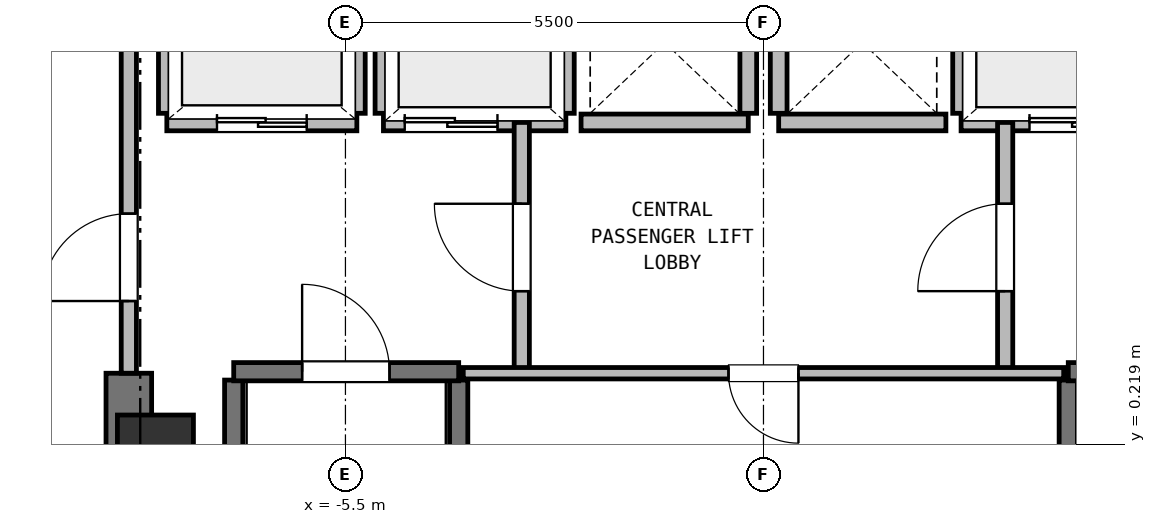
"""IFC4 building model, lengths in metres.
Left out: names, types, materials, properties, quantities, classifications, styles, units other than length and angle.
Written with IfcOpenShell. Run it as: python <this file> out.ifc"""

import sys

from ifc_helpers import new_model, si_unit, direction, frame, frame_2d, origin, origin_2d, place, context, subcontext, project, spatial, rectangle, extrude, element, fill, save


model = new_model("IFC4")
c1 = context("Model", 3, precision=1e-05, world=origin(), true_north=direction((0.0, 1.0)))
c2 = subcontext(c1, "Body", "Model", "MODEL_VIEW")
j1 = project(units=[si_unit("LENGTHUNIT", "METRE"), si_unit("PLANEANGLEUNIT", "RADIAN")], contexts=[c1])
p1 = place(None, origin())
s1 = spatial("IfcSite", under=j1, at=p1, CompositionType="ELEMENT")
p2 = place(p1, origin())
s2 = spatial("IfcBuilding", under=s1, at=p2, CompositionType="ELEMENT")
p3 = place(p2, frame((0.0, 0.0, 131.0)))
s3 = spatial("IfcBuildingStorey", under=s2, at=p3, CompositionType="ELEMENT", Elevation=131.0)
p4 = place(p3, frame((-8.0, 0.0, 0.0), z_axis=(0.0, 0.0, 1.0), x_axis=(1.0, 0.0, 0.0)))
e1 = element("IfcColumn", 1, at=p4, inside=s3, PredefinedType="COLUMN", context=c2, shape_type="SweptSolid", body=[
    extrude(rectangle(XDim=1.0, YDim=1.2, at=origin_2d()), origin(), (0.0, 0.0, 1.0), 3.75),
])
p5 = place(p3, frame((-8.35, -6.95, 0.0), z_axis=(0.0, 0.0, 1.0), x_axis=(0.0, 1.0, 0.0)))
e2 = element("IfcWall", 2, at=p5, inside=s3, PredefinedType="SHEAR", context=c2, shape_type="SweptSolid", body=[
    extrude(rectangle(XDim=8.1, YDim=0.6, at=frame_2d((4.05, 0.0))), origin(), (0.0, 0.0, 1.0), 3.5),
])
for number, where, z_axis, x_axis in (
    (3, (-6.97, -6.16, 0.0), (0.0, 0.0, 1.0), (0.0, 1.0, 0.0)),
    (4, (-4.01, -6.16, 0.0), (0.0, 0.0, 1.0), (0.0, 1.0, 0.0)),
):
    element("IfcWall", number, at=place(p3, frame(where, z_axis=z_axis, x_axis=x_axis)), inside=s3, PredefinedType="SHEAR", context=c2, shape_type="SweptSolid", body=[
        extrude(rectangle(XDim=7.22, YDim=0.24, at=frame_2d((3.61, 0.0))), origin(), (0.0, 0.0, 1.0), 3.5),
    ])
p6 = place(p3, frame((-6.97, 1.17, 0.0), z_axis=(0.0, 0.0, 1.0), x_axis=(1.0, 0.0, 0.0)))
e5 = element("IfcWall", 5, at=p6, inside=s3, PredefinedType="SHEAR", context=c2, shape_type="SweptSolid", body=[
    extrude(rectangle(XDim=2.96, YDim=0.24, at=frame_2d((1.48, 0.0))), origin(), (0.0, 0.0, 1.0), 3.5),
])
p7 = place(p6, frame((0.9, 0.0, 0.0)))
e6 = element("IfcOpeningElement", 6, at=p7, cuts=e5, PredefinedType="OPENING", context=c2, shape_type="SweptSolid", body=[
    extrude(rectangle(XDim=1.15, YDim=2.15, at=frame_2d((0.575, 1.075))), frame((0.0, 0.13, 0.0), z_axis=(0.0, -1.0, 0.0), x_axis=(1.0, 0.0, 0.0)), (0.0, 0.0, 1.0), 0.26),
])
p8 = place(p3, frame((4.01, -6.16, 0.0), z_axis=(0.0, 0.0, 1.0), x_axis=(0.0, 1.0, 0.0)))
e7 = element("IfcWall", 7, at=p8, inside=s3, PredefinedType="SHEAR", context=c2, shape_type="SweptSolid", body=[
    extrude(rectangle(XDim=7.22, YDim=0.24, at=frame_2d((3.61, 0.0))), origin(), (0.0, 0.0, 1.0), 3.5),
])
p9 = place(p3, frame((4.01, 1.17, 0.0), z_axis=(0.0, 0.0, 1.0), x_axis=(1.0, 0.0, 0.0)))
e8 = element("IfcWall", 8, at=p9, inside=s3, PredefinedType="SHEAR", context=c2, shape_type="SweptSolid", body=[
    extrude(rectangle(XDim=2.96, YDim=0.24, at=frame_2d((1.48, 0.0))), origin(), (0.0, 0.0, 1.0), 3.5),
])
p10 = place(p9, frame((0.9, 0.0, 0.0)))
e9 = element("IfcOpeningElement", 9, at=p10, cuts=e8, PredefinedType="OPENING", context=c2, shape_type="SweptSolid", body=[
    extrude(rectangle(XDim=1.15, YDim=2.15, at=frame_2d((0.575, 1.075))), frame((0.0, 0.13, 0.0), z_axis=(0.0, -1.0, 0.0), x_axis=(1.0, 0.0, 0.0)), (0.0, 0.0, 1.0), 0.26),
])
p11 = place(p3, frame((-7.85, 4.45, 0.0), z_axis=(0.0, 0.0, 1.0), x_axis=(1.0, 0.0, 0.0)))
e10 = element("IfcWall", 10, at=p11, inside=s3, PredefinedType="PARTITIONING", context=c2, shape_type="SweptSolid", body=[
    extrude(rectangle(XDim=2.5, YDim=0.22, at=frame_2d((1.25, 0.0))), origin(), (0.0, 0.0, 1.0), 3.5),
])
p12 = place(p11, frame((0.66, 0.0, 0.0)))
e11 = element("IfcOpeningElement", 11, at=p12, cuts=e10, PredefinedType="OPENING", context=c2, shape_type="SweptSolid", body=[
    extrude(rectangle(XDim=1.18, YDim=2.15, at=frame_2d((0.59, 1.075))), frame((0.0, 0.12, 0.0), z_axis=(0.0, -1.0, 0.0), x_axis=(1.0, 0.0, 0.0)), (0.0, 0.0, 1.0), 0.24),
])
p13 = place(p3, frame((-7.85, 4.57, 0.0), z_axis=(0.0, 0.0, 1.0), x_axis=(0.0, 1.0, 0.0)))
e12 = element("IfcWall", 12, at=p13, inside=s3, PredefinedType="PARTITIONING", context=c2, shape_type="SweptSolid", body=[
    extrude(rectangle(XDim=2.08, YDim=0.22, at=frame_2d((1.04, 0.0))), origin(), (0.0, 0.0, 1.0), 3.12),
])
p14 = place(p3, frame((-5.35, 4.57, 0.0), z_axis=(0.0, 0.0, 1.0), x_axis=(0.0, 1.0, 0.0)))
e13 = element("IfcWall", 13, at=p14, inside=s3, PredefinedType="PARTITIONING", context=c2, shape_type="SweptSolid", body=[
    extrude(rectangle(XDim=2.08, YDim=0.22, at=frame_2d((1.04, 0.0))), origin(), (0.0, 0.0, 1.0), 3.5),
])
p15 = place(p3, frame((-5.0, 4.45, 0.0), z_axis=(0.0, 0.0, 1.0), x_axis=(1.0, 0.0, 0.0)))
e14 = element("IfcWall", 14, at=p15, inside=s3, PredefinedType="PARTITIONING", context=c2, shape_type="SweptSolid", body=[
    extrude(rectangle(XDim=2.4, YDim=0.22, at=frame_2d((1.2, 0.0))), origin(), (0.0, 0.0, 1.0), 3.5),
])
p16 = place(p15, frame((0.28, 0.0, 0.0)))
e15 = element("IfcOpeningElement", 15, at=p16, cuts=e14, PredefinedType="OPENING", context=c2, shape_type="SweptSolid", body=[
    extrude(rectangle(XDim=1.22, YDim=2.15, at=frame_2d((0.61, 1.075))), frame((0.0, 0.12, 0.0), z_axis=(0.0, -1.0, 0.0), x_axis=(1.0, 0.0, 0.0)), (0.0, 0.0, 1.0), 0.24),
])
for number, where, z_axis, x_axis in (
    (16, (-5.0, 4.57, 0.0), (0.0, 0.0, 1.0), (0.0, 1.0, 0.0)),
    (17, (-2.6, 4.57, 0.0), (0.0, 0.0, 1.0), (0.0, 1.0, 0.0)),
):
    element("IfcWall", number, at=place(p3, frame(where, z_axis=z_axis, x_axis=x_axis)), inside=s3, PredefinedType="PARTITIONING", context=c2, shape_type="SweptSolid", body=[
        extrude(rectangle(XDim=2.08, YDim=0.22, at=frame_2d((1.04, 0.0))), origin(), (0.0, 0.0, 1.0), 3.5),
    ])
p17 = place(p3, frame((2.6, 4.45, 0.0), z_axis=(0.0, 0.0, 1.0), x_axis=(1.0, 0.0, 0.0)))
e18 = element("IfcWall", 18, at=p17, inside=s3, PredefinedType="PARTITIONING", context=c2, shape_type="SweptSolid", body=[
    extrude(rectangle(XDim=2.4, YDim=0.22, at=frame_2d((1.2, 0.0))), origin(), (0.0, 0.0, 1.0), 3.5),
])
p18 = place(p17, frame((0.9, 0.0, 0.0)))
e19 = element("IfcOpeningElement", 19, at=p18, cuts=e18, PredefinedType="OPENING", context=c2, shape_type="SweptSolid", body=[
    extrude(rectangle(XDim=1.22, YDim=2.15, at=frame_2d((0.61, 1.075))), frame((0.0, 0.12, 0.0), z_axis=(0.0, -1.0, 0.0), x_axis=(1.0, 0.0, 0.0)), (0.0, 0.0, 1.0), 0.24),
])
p19 = place(p3, frame((2.6, 4.57, 0.0), z_axis=(0.0, 0.0, 1.0), x_axis=(0.0, 1.0, 0.0)))
e20 = element("IfcWall", 20, at=p19, inside=s3, PredefinedType="PARTITIONING", context=c2, shape_type="SweptSolid", body=[
    extrude(rectangle(XDim=2.08, YDim=0.22, at=frame_2d((1.04, 0.0))), origin(), (0.0, 0.0, 1.0), 3.5),
])
p20 = place(p3, frame((-2.4, 4.45, 0.0), z_axis=(0.0, 0.0, 1.0), x_axis=(1.0, 0.0, 0.0)))
e21 = element("IfcWall", 21, at=p20, inside=s3, PredefinedType="PARTITIONING", context=c2, shape_type="SweptSolid", body=[
    extrude(rectangle(XDim=2.2, YDim=0.22, at=frame_2d((1.1, 0.0))), origin(), (0.0, 0.0, 1.0), 3.5),
])
p21 = place(p3, frame((-0.2, 4.57, 0.0), z_axis=(0.0, 0.0, 1.0), x_axis=(0.0, 1.0, 0.0)))
e22 = element("IfcWall", 22, at=p21, inside=s3, PredefinedType="PARTITIONING", context=c2, shape_type="SweptSolid", body=[
    extrude(rectangle(XDim=2.08, YDim=0.22, at=frame_2d((1.04, 0.0))), origin(), (0.0, 0.0, 1.0), 3.5),
])
p22 = place(p3, frame((0.2, 4.45, 0.0), z_axis=(0.0, 0.0, 1.0), x_axis=(1.0, 0.0, 0.0)))
e23 = element("IfcWall", 23, at=p22, inside=s3, PredefinedType="PARTITIONING", context=c2, shape_type="SweptSolid", body=[
    extrude(rectangle(XDim=2.2, YDim=0.22, at=frame_2d((1.1, 0.0))), origin(), (0.0, 0.0, 1.0), 3.5),
])
p23 = place(p3, frame((0.2, 4.57, 0.0), z_axis=(0.0, 0.0, 1.0), x_axis=(0.0, 1.0, 0.0)))
e24 = element("IfcWall", 24, at=p23, inside=s3, PredefinedType="PARTITIONING", context=c2, shape_type="SweptSolid", body=[
    extrude(rectangle(XDim=2.08, YDim=0.22, at=frame_2d((1.04, 0.0))), origin(), (0.0, 0.0, 1.0), 3.5),
])
p24 = place(p3, frame((-3.18, 1.15, 0.0), z_axis=(0.0, 0.0, 1.0), x_axis=(0.0, 1.0, 0.0)))
e25 = element("IfcWall", 25, at=p24, inside=s3, PredefinedType="PARTITIONING", context=c2, shape_type="SweptSolid", body=[
    extrude(rectangle(XDim=3.3, YDim=0.2, at=frame_2d((1.65, 0.0))), origin(), (0.0, 0.0, 1.0), 3.5),
])
p25 = place(p24, frame((1.08, 0.0, 0.0)))
e26 = element("IfcOpeningElement", 26, at=p25, cuts=e25, PredefinedType="OPENING", context=c2, shape_type="SweptSolid", body=[
    extrude(rectangle(XDim=1.15, YDim=2.15, at=frame_2d((0.575, 1.075))), frame((0.0, 0.11, 0.0), z_axis=(0.0, -1.0, 0.0), x_axis=(1.0, 0.0, 0.0)), (0.0, 0.0, 1.0), 0.22),
])
p26 = place(p3, frame((3.18, 1.15, 0.0), z_axis=(0.0, 0.0, 1.0), x_axis=(0.0, 1.0, 0.0)))
e27 = element("IfcWall", 27, at=p26, inside=s3, PredefinedType="PARTITIONING", context=c2, shape_type="SweptSolid", body=[
    extrude(rectangle(XDim=3.3, YDim=0.2, at=frame_2d((1.65, 0.0))), origin(), (0.0, 0.0, 1.0), 3.5),
])
p27 = place(p26, frame((1.08, 0.0, 0.0)))
e28 = element("IfcOpeningElement", 28, at=p27, cuts=e27, PredefinedType="OPENING", context=c2, shape_type="SweptSolid", body=[
    extrude(rectangle(XDim=1.15, YDim=2.15, at=frame_2d((0.575, 1.075))), frame((0.0, 0.11, 0.0), z_axis=(0.0, -1.0, 0.0), x_axis=(1.0, 0.0, 0.0)), (0.0, 0.0, 1.0), 0.22),
])
p28 = place(p3, frame((-8.35, 1.15, 0.0), z_axis=(0.0, 0.0, 1.0), x_axis=(0.0, 1.0, 0.0)))
e29 = element("IfcWall", 29, at=p28, inside=s3, PredefinedType="PARTITIONING", context=c2, shape_type="SweptSolid", body=[
    extrude(rectangle(XDim=5.4, YDim=0.2, at=frame_2d((2.7, 0.0))), origin(), (0.0, 0.0, 1.0), 3.5),
])
p29 = place(p28, frame((0.95, 0.0, 0.0)))
e30 = element("IfcOpeningElement", 30, at=p29, cuts=e29, PredefinedType="OPENING", context=c2, shape_type="SweptSolid", body=[
    extrude(rectangle(XDim=1.15, YDim=2.15, at=frame_2d((0.575, 1.075))), frame((0.0, 0.11, 0.0), z_axis=(0.0, -1.0, 0.0), x_axis=(1.0, 0.0, 0.0)), (0.0, 0.0, 1.0), 0.22),
])
p30 = place(p3, frame((3.95, 1.15, 0.0), z_axis=(0.0, 0.0, 1.0), x_axis=(-1.0, 0.0, 0.0)))
e31 = element("IfcWall", 31, at=p30, inside=s3, PredefinedType="PARTITIONING", context=c2, shape_type="SweptSolid", body=[
    extrude(rectangle(XDim=7.9, YDim=0.15, at=frame_2d((3.95, 0.0))), origin(), (0.0, 0.0, 1.0), 3.5),
])
p31 = place(p30, frame((3.49, 0.0, 0.0)))
e32 = element("IfcOpeningElement", 32, at=p31, cuts=e31, PredefinedType="OPENING", context=c2, shape_type="SweptSolid", body=[
    extrude(rectangle(XDim=0.92, YDim=2.05, at=frame_2d((0.46, 1.025))), frame((0.0, 0.085, 0.0), z_axis=(0.0, -1.0, 0.0), x_axis=(1.0, 0.0, 0.0)), (0.0, 0.0, 1.0), 0.17),
])
p32 = place(p7, origin())
e33 = element("IfcDoor", 33, at=p32, inside=s3, OperationType="SINGLE_SWING_LEFT", PredefinedType="DOOR", context=c2, shape_type="SweptSolid", body=[
    extrude(rectangle(XDim=1.15, YDim=2.15, at=frame_2d((0.575, 1.075))), frame((0.0, 0.025, 0.0), z_axis=(0.0, -1.0, 0.0), x_axis=(1.0, 0.0, 0.0)), (0.0, 0.0, 1.0), 0.05),
])
fill(e6, e33)
p33 = place(p12, origin())
e34 = element("IfcDoor", 34, at=p33, inside=s3, OperationType="DOUBLE_DOOR_SLIDING", PredefinedType="DOOR", context=c2, shape_type="SweptSolid", body=[
    extrude(rectangle(XDim=1.18, YDim=2.15, at=frame_2d((0.59, 1.075))), frame((0.0, 0.025, 0.0), z_axis=(0.0, -1.0, 0.0), x_axis=(1.0, 0.0, 0.0)), (0.0, 0.0, 1.0), 0.05),
])
fill(e11, e34)
p34 = place(p16, origin())
e35 = element("IfcDoor", 35, at=p34, inside=s3, OperationType="DOUBLE_DOOR_SLIDING", PredefinedType="DOOR", context=c2, shape_type="SweptSolid", body=[
    extrude(rectangle(XDim=1.22, YDim=2.15, at=frame_2d((0.61, 1.075))), frame((0.0, 0.025, 0.0), z_axis=(0.0, -1.0, 0.0), x_axis=(1.0, 0.0, 0.0)), (0.0, 0.0, 1.0), 0.05),
])
fill(e15, e35)
p35 = place(p18, origin())
e36 = element("IfcDoor", 36, at=p35, inside=s3, OperationType="DOUBLE_DOOR_SLIDING", PredefinedType="DOOR", context=c2, shape_type="SweptSolid", body=[
    extrude(rectangle(XDim=1.22, YDim=2.15, at=frame_2d((0.61, 1.075))), frame((0.0, 0.025, 0.0), z_axis=(0.0, -1.0, 0.0), x_axis=(1.0, 0.0, 0.0)), (0.0, 0.0, 1.0), 0.05),
])
fill(e19, e36)
p36 = place(p25, origin())
e37 = element("IfcDoor", 37, at=p36, inside=s3, OperationType="SINGLE_SWING_RIGHT", PredefinedType="DOOR", context=c2, shape_type="SweptSolid", body=[
    extrude(rectangle(XDim=1.15, YDim=2.15, at=frame_2d((0.575, 1.075))), frame((0.0, 0.025, 0.0), z_axis=(0.0, -1.0, 0.0), x_axis=(1.0, 0.0, 0.0)), (0.0, 0.0, 1.0), 0.05),
])
fill(e26, e37)
p37 = place(p27, origin())
e38 = element("IfcDoor", 38, at=p37, inside=s3, OperationType="SINGLE_SWING_LEFT", PredefinedType="DOOR", context=c2, shape_type="SweptSolid", body=[
    extrude(rectangle(XDim=1.15, YDim=2.15, at=frame_2d((0.575, 1.075))), frame((0.0, 0.025, 0.0), z_axis=(0.0, -1.0, 0.0), x_axis=(1.0, 0.0, 0.0)), (0.0, 0.0, 1.0), 0.05),
])
fill(e28, e38)
p38 = place(p29, origin())
e39 = element("IfcDoor", 39, at=p38, inside=s3, OperationType="SINGLE_SWING_LEFT", PredefinedType="DOOR", context=c2, shape_type="SweptSolid", body=[
    extrude(rectangle(XDim=1.15, YDim=2.15, at=frame_2d((0.575, 1.075))), frame((0.0, 0.025, 0.0), z_axis=(0.0, -1.0, 0.0), x_axis=(1.0, 0.0, 0.0)), (0.0, 0.0, 1.0), 0.05),
])
fill(e30, e39)
p39 = place(p31, origin())
e40 = element("IfcDoor", 40, at=p39, inside=s3, OperationType="SINGLE_SWING_LEFT", PredefinedType="DOOR", context=c2, shape_type="SweptSolid", body=[
    extrude(rectangle(XDim=0.92, YDim=2.05, at=frame_2d((0.46, 1.025))), frame((0.0, 0.025, 0.0), z_axis=(0.0, -1.0, 0.0), x_axis=(1.0, 0.0, 0.0)), (0.0, 0.0, 1.0), 0.05),
])
fill(e32, e40)
save(model, sys.argv[1])
